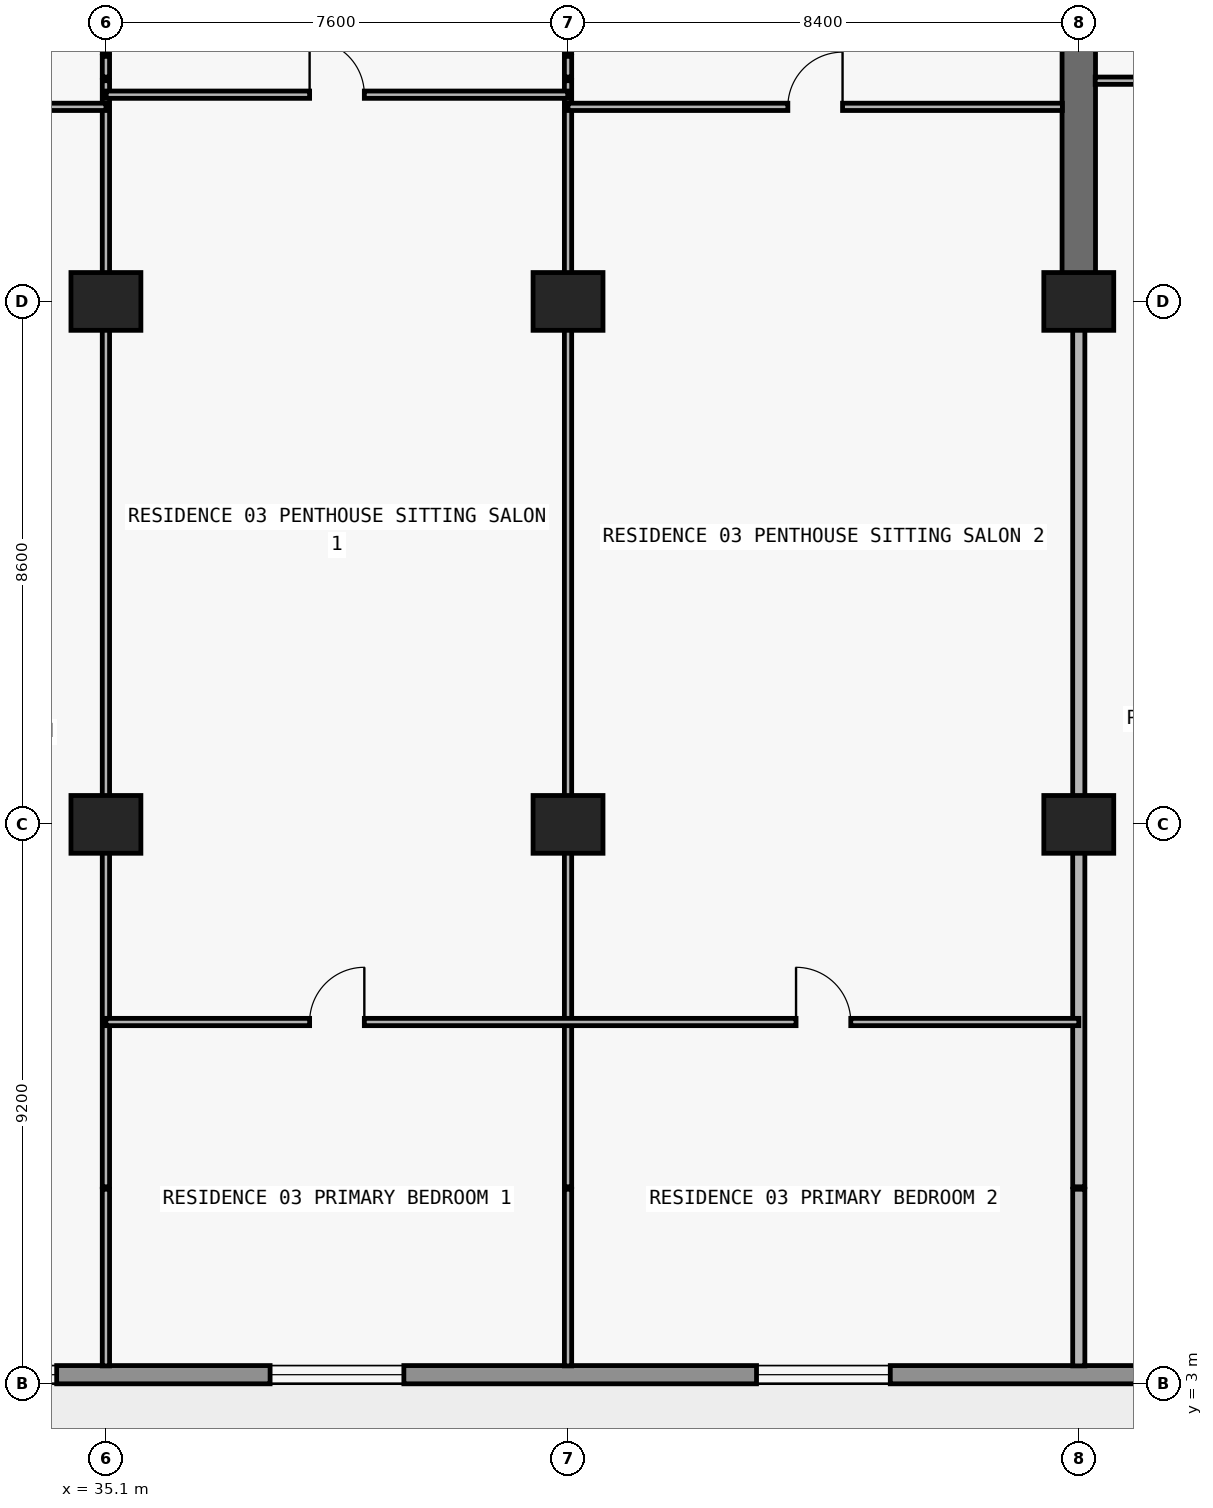
"""IFC4 building model, lengths in metres.
Left out: names, types, materials, properties, quantities, classifications, styles, units other than length and angle.
Written with IfcOpenShell. Run it as: python <this file> out.ifc"""

import sys

from ifc_helpers import new_model, si_unit, direction, frame, frame_2d, origin, origin_2d, place, context, subcontext, project, spatial, rectangle, extrude, element, fill, save


model = new_model("IFC4")
c1 = context("Model", 3, precision=1e-05, world=origin(), true_north=direction((0.0, 1.0)))
c2 = subcontext(c1, "Body", "Model", "MODEL_VIEW")
j1 = project(units=[si_unit("LENGTHUNIT", "METRE"), si_unit("PLANEANGLEUNIT", "RADIAN")], contexts=[c1])
p1 = place(None, origin())
s1 = spatial("IfcSite", under=j1, at=p1, CompositionType="ELEMENT")
p2 = place(p1, origin())
s2 = spatial("IfcBuilding", under=s1, at=p2, CompositionType="ELEMENT")
p3 = place(p2, frame((0.0, 0.0, 49.8)))
s3 = spatial("IfcBuildingStorey", under=s2, at=p3, CompositionType="ELEMENT", Elevation=49.8)
for number, where, z_axis, x_axis in (
    (1, (35.1, 12.2, 0.0), (0.0, 0.0, 1.0), (1.0, 0.0, 0.0)),
    (2, (42.7, 12.2, 0.0), (0.0, 0.0, 1.0), (1.0, 0.0, 0.0)),
    (3, (51.1, 12.2, 0.0), (0.0, 0.0, 1.0), (1.0, 0.0, 0.0)),
    (4, (35.1, 20.8, 0.0), (0.0, 0.0, 1.0), (1.0, 0.0, 0.0)),
    (5, (42.7, 20.8, 0.0), (0.0, 0.0, 1.0), (1.0, 0.0, 0.0)),
    (6, (51.1, 20.8, 0.0), (0.0, 0.0, 1.0), (1.0, 0.0, 0.0)),
):
    element("IfcColumn", number, at=place(p3, frame(where, z_axis=z_axis, x_axis=x_axis)), inside=s3, PredefinedType="COLUMN", context=c2, shape_type="SweptSolid", body=[
        extrude(rectangle(XDim=1.15, YDim=0.95, at=origin_2d()), origin(), (0.0, 0.0, 1.0), 3.05),
    ])
p4 = place(p3, frame((51.1, 20.8, 0.0), z_axis=(0.0, 0.0, 1.0), x_axis=(0.0, 1.0, 0.0)))
e7 = element("IfcWall", 7, at=p4, inside=s3, PredefinedType="SHEAR", context=c2, shape_type="SweptSolid", body=[
    extrude(rectangle(XDim=8.6, YDim=0.55, at=frame_2d((4.3, 0.0))), origin(), (0.0, 0.0, 1.0), 3.05),
])
p5 = place(p3, frame((72.7, 3.15, 0.0), z_axis=(0.0, 0.0, 1.0), x_axis=(-1.0, 0.0, 0.0)))
e8 = element("IfcWall", 8, at=p5, inside=s3, PredefinedType="STANDARD", context=c2, shape_type="SweptSolid", body=[
    extrude(rectangle(XDim=67.6, YDim=0.3, at=frame_2d((33.8, 0.0))), origin(), (0.0, 0.0, 1.0), 3.05),
])
p6 = place(p5, frame((59.826, 0.0, 0.0)))
e9 = element("IfcOpeningElement", 9, at=p6, cuts=e8, PredefinedType="OPENING", context=c2, shape_type="SweptSolid", body=[
    extrude(rectangle(XDim=2.0, YDim=2.3, at=frame_2d((1.0, 1.15))), frame((0.0, 0.16, 0.0), z_axis=(0.0, -1.0, 0.0), x_axis=(1.0, 0.0, 0.0)), (0.0, 0.0, 1.0), 0.32),
])
p7 = place(p5, frame((55.526, 0.0, 0.85)))
e10 = element("IfcOpeningElement", 10, at=p7, cuts=e8, PredefinedType="OPENING", context=c2, shape_type="SweptSolid", body=[
    extrude(rectangle(XDim=2.2, YDim=1.55, at=frame_2d((1.1, 0.775))), frame((0.0, 0.16, 0.0), z_axis=(0.0, -1.0, 0.0), x_axis=(1.0, 0.0, 0.0)), (0.0, 0.0, 1.0), 0.32),
])
p8 = place(p5, frame((51.09, 0.0, 0.0)))
e11 = element("IfcOpeningElement", 11, at=p8, cuts=e8, PredefinedType="OPENING", context=c2, shape_type="SweptSolid", body=[
    extrude(rectangle(XDim=2.0, YDim=2.3, at=frame_2d((1.0, 1.15))), frame((0.0, 0.16, 0.0), z_axis=(0.0, -1.0, 0.0), x_axis=(1.0, 0.0, 0.0)), (0.0, 0.0, 1.0), 0.32),
])
p9 = place(p5, frame((46.99, 0.0, 0.85)))
e12 = element("IfcOpeningElement", 12, at=p9, cuts=e8, PredefinedType="OPENING", context=c2, shape_type="SweptSolid", body=[
    extrude(rectangle(XDim=1.8, YDim=1.55, at=frame_2d((0.9, 0.775))), frame((0.0, 0.16, 0.0), z_axis=(0.0, -1.0, 0.0), x_axis=(1.0, 0.0, 0.0)), (0.0, 0.0, 1.0), 0.32),
])
p10 = place(p5, frame((43.09, 0.0, 0.0)))
e13 = element("IfcOpeningElement", 13, at=p10, cuts=e8, PredefinedType="OPENING", context=c2, shape_type="SweptSolid", body=[
    extrude(rectangle(XDim=2.0, YDim=2.3, at=frame_2d((1.0, 1.15))), frame((0.0, 0.16, 0.0), z_axis=(0.0, -1.0, 0.0), x_axis=(1.0, 0.0, 0.0)), (0.0, 0.0, 1.0), 0.32),
])
p11 = place(p5, frame((38.41, 0.0, 0.65)))
e14 = element("IfcOpeningElement", 14, at=p11, cuts=e8, PredefinedType="OPENING", context=c2, shape_type="SweptSolid", body=[
    extrude(rectangle(XDim=2.6, YDim=1.85, at=frame_2d((1.3, 0.925))), frame((0.0, 0.16, 0.0), z_axis=(0.0, -1.0, 0.0), x_axis=(1.0, 0.0, 0.0)), (0.0, 0.0, 1.0), 0.32),
])
p12 = place(p5, frame((32.7, 0.0, 0.85)))
e15 = element("IfcOpeningElement", 15, at=p12, cuts=e8, PredefinedType="OPENING", context=c2, shape_type="SweptSolid", body=[
    extrude(rectangle(XDim=2.2, YDim=1.55, at=frame_2d((1.1, 0.775))), frame((0.0, 0.16, 0.0), z_axis=(0.0, -1.0, 0.0), x_axis=(1.0, 0.0, 0.0)), (0.0, 0.0, 1.0), 0.32),
])
p13 = place(p5, frame((24.7, 0.0, 0.85)))
e16 = element("IfcOpeningElement", 16, at=p13, cuts=e8, PredefinedType="OPENING", context=c2, shape_type="SweptSolid", body=[
    extrude(rectangle(XDim=2.2, YDim=1.55, at=frame_2d((1.1, 0.775))), frame((0.0, 0.16, 0.0), z_axis=(0.0, -1.0, 0.0), x_axis=(1.0, 0.0, 0.0)), (0.0, 0.0, 1.0), 0.32),
])
p14 = place(p5, frame((18.29, 0.0, 0.0)))
e17 = element("IfcOpeningElement", 17, at=p14, cuts=e8, PredefinedType="OPENING", context=c2, shape_type="SweptSolid", body=[
    extrude(rectangle(XDim=2.0, YDim=2.3, at=frame_2d((1.0, 1.15))), frame((0.0, 0.16, 0.0), z_axis=(0.0, -1.0, 0.0), x_axis=(1.0, 0.0, 0.0)), (0.0, 0.0, 1.0), 0.32),
])
p15 = place(p5, frame((14.19, 0.0, 0.85)))
e18 = element("IfcOpeningElement", 18, at=p15, cuts=e8, PredefinedType="OPENING", context=c2, shape_type="SweptSolid", body=[
    extrude(rectangle(XDim=1.8, YDim=1.55, at=frame_2d((0.9, 0.775))), frame((0.0, 0.16, 0.0), z_axis=(0.0, -1.0, 0.0), x_axis=(1.0, 0.0, 0.0)), (0.0, 0.0, 1.0), 0.32),
])
p16 = place(p5, frame((10.226, 0.0, 0.0)))
e19 = element("IfcOpeningElement", 19, at=p16, cuts=e8, PredefinedType="OPENING", context=c2, shape_type="SweptSolid", body=[
    extrude(rectangle(XDim=2.0, YDim=2.3, at=frame_2d((1.0, 1.15))), frame((0.0, 0.16, 0.0), z_axis=(0.0, -1.0, 0.0), x_axis=(1.0, 0.0, 0.0)), (0.0, 0.0, 1.0), 0.32),
])
p17 = place(p5, frame((5.926, 0.0, 0.85)))
e20 = element("IfcOpeningElement", 20, at=p17, cuts=e8, PredefinedType="OPENING", context=c2, shape_type="SweptSolid", body=[
    extrude(rectangle(XDim=2.2, YDim=1.55, at=frame_2d((1.1, 0.775))), frame((0.0, 0.16, 0.0), z_axis=(0.0, -1.0, 0.0), x_axis=(1.0, 0.0, 0.0)), (0.0, 0.0, 1.0), 0.32),
])
p18 = place(p3, frame((35.1, 3.295, 0.0), z_axis=(0.0, 0.0, 1.0), x_axis=(0.0, 1.0, 0.0)))
e21 = element("IfcWall", 21, at=p18, inside=s3, PredefinedType="PARTITIONING", context=c2, shape_type="SweptSolid", body=[
    extrude(rectangle(XDim=2.905, YDim=0.12, at=frame_2d((1.453, 0.0))), origin(), (0.0, 0.0, 1.0), 3.05),
])
p19 = place(p3, frame((35.1, 6.24, 0.0), z_axis=(0.0, 0.0, 1.0), x_axis=(0.0, 1.0, 0.0)))
e22 = element("IfcWall", 22, at=p19, inside=s3, PredefinedType="PARTITIONING", context=c2, shape_type="SweptSolid", body=[
    extrude(rectangle(XDim=18.19, YDim=0.12, at=frame_2d((9.095, 0.0))), origin(), (0.0, 0.0, 1.0), 2.11),
])
p20 = place(p3, frame((35.1, 24.49, 0.0), z_axis=(0.0, 0.0, 1.0), x_axis=(0.0, 1.0, 0.0)))
e23 = element("IfcWall", 23, at=p20, inside=s3, PredefinedType="PARTITIONING", context=c2, shape_type="SweptSolid", body=[
    extrude(rectangle(XDim=0.34, YDim=0.12, at=frame_2d((0.17, 0.0))), origin(), (0.0, 0.0, 1.0), 2.11),
])
p21 = place(p3, frame((42.7, 3.295, 0.0), z_axis=(0.0, 0.0, 1.0), x_axis=(0.0, 1.0, 0.0)))
e24 = element("IfcWall", 24, at=p21, inside=s3, PredefinedType="PARTITIONING", context=c2, shape_type="SweptSolid", body=[
    extrude(rectangle(XDim=2.905, YDim=0.12, at=frame_2d((1.453, 0.0))), origin(), (0.0, 0.0, 1.0), 3.05),
])
p22 = place(p3, frame((42.7, 6.24, 0.0), z_axis=(0.0, 0.0, 1.0), x_axis=(0.0, 1.0, 0.0)))
e25 = element("IfcWall", 25, at=p22, inside=s3, PredefinedType="PARTITIONING", context=c2, shape_type="SweptSolid", body=[
    extrude(rectangle(XDim=18.19, YDim=0.12, at=frame_2d((9.095, 0.0))), origin(), (0.0, 0.0, 1.0), 2.11),
])
p23 = place(p3, frame((42.7, 24.49, 0.0), z_axis=(0.0, 0.0, 1.0), x_axis=(0.0, 1.0, 0.0)))
e26 = element("IfcWall", 26, at=p23, inside=s3, PredefinedType="PARTITIONING", context=c2, shape_type="SweptSolid", body=[
    extrude(rectangle(XDim=0.34, YDim=0.12, at=frame_2d((0.17, 0.0))), origin(), (0.0, 0.0, 1.0), 2.11),
])
p24 = place(p3, frame((51.1, 3.295, 0.0), z_axis=(0.0, 0.0, 1.0), x_axis=(0.0, 1.0, 0.0)))
e27 = element("IfcWall", 27, at=p24, inside=s3, PredefinedType="PARTITIONING", context=c2, shape_type="SweptSolid", body=[
    extrude(rectangle(XDim=2.905, YDim=0.2, at=frame_2d((1.453, 0.0))), origin(), (0.0, 0.0, 1.0), 3.05),
])
p25 = place(p3, frame((51.1, 6.24, 0.0), z_axis=(0.0, 0.0, 1.0), x_axis=(0.0, 1.0, 0.0)))
e28 = element("IfcWall", 28, at=p25, inside=s3, PredefinedType="PARTITIONING", context=c2, shape_type="SweptSolid", body=[
    extrude(rectangle(XDim=14.555, YDim=0.2, at=frame_2d((7.277, 0.0))), origin(), (0.0, 0.0, 1.0), 2.11),
])
p26 = place(p3, frame((35.1, 8.95, 0.0), z_axis=(0.0, 0.0, 1.0), x_axis=(1.0, 0.0, 0.0)))
e29 = element("IfcWall", 29, at=p26, inside=s3, PredefinedType="PARTITIONING", context=c2, shape_type="SweptSolid", body=[
    extrude(rectangle(XDim=16.0, YDim=0.12, at=frame_2d((8.0, 0.0))), origin(), (0.0, 0.0, 1.0), 3.05),
])
p27 = place(p26, frame((3.35, 0.0, 0.0)))
e30 = element("IfcOpeningElement", 30, at=p27, cuts=e29, PredefinedType="OPENING", context=c2, shape_type="SweptSolid", body=[
    extrude(rectangle(XDim=0.9, YDim=2.15, at=frame_2d((0.45, 1.075))), frame((0.0, 0.07, 0.0), z_axis=(0.0, -1.0, 0.0), x_axis=(1.0, 0.0, 0.0)), (0.0, 0.0, 1.0), 0.14),
])
p28 = place(p26, frame((11.35, 0.0, 0.0)))
e31 = element("IfcOpeningElement", 31, at=p28, cuts=e29, PredefinedType="OPENING", context=c2, shape_type="SweptSolid", body=[
    extrude(rectangle(XDim=0.9, YDim=2.15, at=frame_2d((0.45, 1.075))), frame((0.0, 0.07, 0.0), z_axis=(0.0, -1.0, 0.0), x_axis=(1.0, 0.0, 0.0)), (0.0, 0.0, 1.0), 0.14),
])
p29 = place(p3, frame((26.97, 24.0, 0.0), z_axis=(0.0, 0.0, 1.0), x_axis=(1.0, 0.0, 0.0)))
e32 = element("IfcWall", 32, at=p29, inside=s3, PredefinedType="PARTITIONING", context=c2, shape_type="SweptSolid", body=[
    extrude(rectangle(XDim=8.13, YDim=0.12, at=frame_2d((4.065, 0.0))), origin(), (0.0, 0.0, 1.0), 3.05),
])
p30 = place(p29, frame((1.305, 0.0, 0.0)))
e33 = element("IfcOpeningElement", 33, at=p30, cuts=e32, PredefinedType="OPENING", context=c2, shape_type="SweptSolid", body=[
    extrude(rectangle(XDim=0.9, YDim=2.15, at=frame_2d((0.45, 1.075))), frame((0.0, 0.07, 0.0), z_axis=(0.0, -1.0, 0.0), x_axis=(1.0, 0.0, 0.0)), (0.0, 0.0, 1.0), 0.14),
])
p31 = place(p3, frame((42.7, 24.0, 0.0), z_axis=(0.0, 0.0, 1.0), x_axis=(1.0, 0.0, 0.0)))
e34 = element("IfcWall", 34, at=p31, inside=s3, PredefinedType="PARTITIONING", context=c2, shape_type="SweptSolid", body=[
    extrude(rectangle(XDim=8.13, YDim=0.12, at=frame_2d((4.065, 0.0))), origin(), (0.0, 0.0, 1.0), 3.05),
])
p32 = place(p31, frame((3.615, 0.0, 0.0)))
e35 = element("IfcOpeningElement", 35, at=p32, cuts=e34, PredefinedType="OPENING", context=c2, shape_type="SweptSolid", body=[
    extrude(rectangle(XDim=0.9, YDim=2.15, at=frame_2d((0.45, 1.075))), frame((0.0, 0.07, 0.0), z_axis=(0.0, -1.0, 0.0), x_axis=(1.0, 0.0, 0.0)), (0.0, 0.0, 1.0), 0.14),
])
p33 = place(p3, frame((35.105, 24.2, 0.0), z_axis=(0.0, 0.0, 1.0), x_axis=(1.0, 0.0, 0.0)))
e36 = element("IfcWall", 36, at=p33, inside=s3, PredefinedType="PARTITIONING", context=c2, shape_type="SweptSolid", body=[
    extrude(rectangle(XDim=7.59, YDim=0.12, at=frame_2d((3.795, 0.0))), origin(), (0.0, 0.0, 1.0), 3.05),
])
p34 = place(p33, frame((3.345, 0.0, 0.0)))
e37 = element("IfcOpeningElement", 37, at=p34, cuts=e36, PredefinedType="OPENING", context=c2, shape_type="SweptSolid", body=[
    extrude(rectangle(XDim=0.9, YDim=2.15, at=frame_2d((0.45, 1.075))), frame((0.0, 0.07, 0.0), z_axis=(0.0, -1.0, 0.0), x_axis=(1.0, 0.0, 0.0)), (0.0, 0.0, 1.0), 0.14),
])
p35 = place(p3, frame((51.37, 24.43, 0.0), z_axis=(0.0, 0.0, 1.0), x_axis=(1.0, 0.0, 0.0)))
e38 = element("IfcWall", 38, at=p35, inside=s3, PredefinedType="PARTITIONING", context=c2, shape_type="SweptSolid", body=[
    extrude(rectangle(XDim=8.13, YDim=0.12, at=frame_2d((4.065, 0.0))), origin(), (0.0, 0.0, 1.0), 3.05),
])
p36 = place(p35, frame((1.558, 0.0, 0.0)))
e39 = element("IfcOpeningElement", 39, at=p36, cuts=e38, PredefinedType="OPENING", context=c2, shape_type="SweptSolid", body=[
    extrude(rectangle(XDim=0.9, YDim=2.15, at=frame_2d((0.45, 1.075))), frame((0.0, 0.07, 0.0), z_axis=(0.0, -1.0, 0.0), x_axis=(1.0, 0.0, 0.0)), (0.0, 0.0, 1.0), 0.14),
])
p37 = place(p35, frame((5.79, 0.0, 0.0)))
e40 = element("IfcOpeningElement", 40, at=p37, cuts=e38, PredefinedType="OPENING", context=c2, shape_type="SweptSolid", body=[
    extrude(rectangle(XDim=0.9, YDim=2.15, at=frame_2d((0.45, 1.075))), frame((0.0, 0.07, 0.0), z_axis=(0.0, -1.0, 0.0), x_axis=(1.0, 0.0, 0.0)), (0.0, 0.0, 1.0), 0.14),
])
p38 = place(p11, origin())
e41 = element("IfcWindow", 41, at=p38, inside=s3, PartitioningType="SINGLE_PANEL", PredefinedType="WINDOW", context=c2, shape_type="SweptSolid", body=[
    extrude(rectangle(XDim=2.6, YDim=1.85, at=frame_2d((1.3, 0.925))), frame((0.0, 0.03, 0.0), z_axis=(0.0, -1.0, 0.0), x_axis=(1.0, 0.0, 0.0)), (0.0, 0.0, 1.0), 0.06),
])
fill(e14, e41)
p39 = place(p12, origin())
e42 = element("IfcWindow", 42, at=p39, inside=s3, PartitioningType="SINGLE_PANEL", PredefinedType="WINDOW", context=c2, shape_type="SweptSolid", body=[
    extrude(rectangle(XDim=2.2, YDim=1.55, at=frame_2d((1.1, 0.775))), frame((0.0, 0.03, 0.0), z_axis=(0.0, -1.0, 0.0), x_axis=(1.0, 0.0, 0.0)), (0.0, 0.0, 1.0), 0.06),
])
fill(e15, e42)
p40 = place(p13, origin())
e43 = element("IfcWindow", 43, at=p40, inside=s3, PartitioningType="SINGLE_PANEL", PredefinedType="WINDOW", context=c2, shape_type="SweptSolid", body=[
    extrude(rectangle(XDim=2.2, YDim=1.55, at=frame_2d((1.1, 0.775))), frame((0.0, 0.03, 0.0), z_axis=(0.0, -1.0, 0.0), x_axis=(1.0, 0.0, 0.0)), (0.0, 0.0, 1.0), 0.06),
])
fill(e16, e43)
p41 = place(p34, origin())
e44 = element("IfcDoor", 44, at=p41, inside=s3, OperationType="SINGLE_SWING_LEFT", PredefinedType="DOOR", context=c2, shape_type="SweptSolid", body=[
    extrude(rectangle(XDim=0.9, YDim=2.15, at=frame_2d((0.45, 1.075))), frame((0.0, 0.025, 0.0), z_axis=(0.0, -1.0, 0.0), x_axis=(1.0, 0.0, 0.0)), (0.0, 0.0, 1.0), 0.05),
])
fill(e37, e44)
p42 = place(p27, origin())
e45 = element("IfcDoor", 45, at=p42, inside=s3, OperationType="SINGLE_SWING_RIGHT", PredefinedType="DOOR", context=c2, shape_type="SweptSolid", body=[
    extrude(rectangle(XDim=0.9, YDim=2.15, at=frame_2d((0.45, 1.075))), frame((0.0, 0.025, 0.0), z_axis=(0.0, -1.0, 0.0), x_axis=(1.0, 0.0, 0.0)), (0.0, 0.0, 1.0), 0.05),
])
fill(e30, e45)
p43 = place(p32, origin())
e46 = element("IfcDoor", 46, at=p43, inside=s3, OperationType="SINGLE_SWING_RIGHT", PredefinedType="DOOR", context=c2, shape_type="SweptSolid", body=[
    extrude(rectangle(XDim=0.9, YDim=2.15, at=frame_2d((0.45, 1.075))), frame((0.0, 0.025, 0.0), z_axis=(0.0, -1.0, 0.0), x_axis=(1.0, 0.0, 0.0)), (0.0, 0.0, 1.0), 0.05),
])
fill(e35, e46)
p44 = place(p28, origin())
e47 = element("IfcDoor", 47, at=p44, inside=s3, OperationType="SINGLE_SWING_LEFT", PredefinedType="DOOR", context=c2, shape_type="SweptSolid", body=[
    extrude(rectangle(XDim=0.9, YDim=2.15, at=frame_2d((0.45, 1.075))), frame((0.0, 0.025, 0.0), z_axis=(0.0, -1.0, 0.0), x_axis=(1.0, 0.0, 0.0)), (0.0, 0.0, 1.0), 0.05),
])
fill(e31, e47)
save(model, sys.argv[1])
